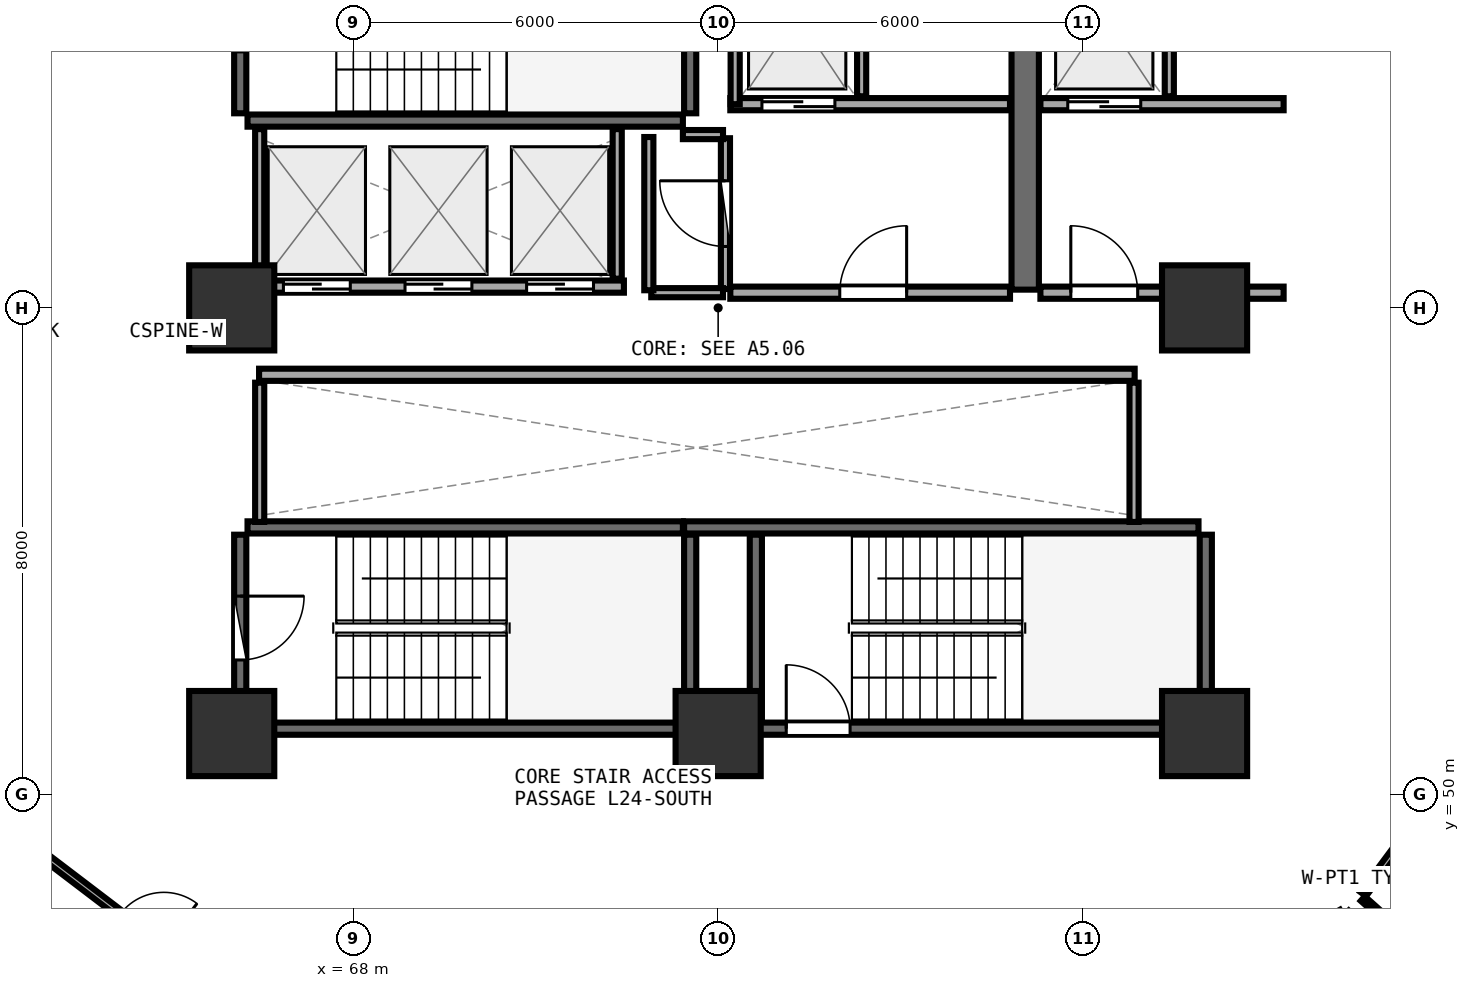
"""IFC4 building model, lengths in metres.
Left out: names, types, materials, properties, quantities, classifications, styles, units other than length and angle.
Written with IfcOpenShell. Run it as: python <this file> out.ifc"""

import sys

from ifc_helpers import new_model, si_unit, direction, frame, frame_2d, origin, origin_2d, place, context, subcontext, project, spatial, rectangle, extrude, element, fill, save


model = new_model("IFC4")
c1 = context("Model", 3, precision=1e-05, world=origin(), true_north=direction((0.0, 1.0)))
c2 = subcontext(c1, "Body", "Model", "MODEL_VIEW")
j1 = project(units=[si_unit("LENGTHUNIT", "METRE"), si_unit("PLANEANGLEUNIT", "RADIAN")], contexts=[c1])
p1 = place(None, origin())
s1 = spatial("IfcSite", under=j1, at=p1, CompositionType="ELEMENT")
p2 = place(p1, origin())
s2 = spatial("IfcBuilding", under=s1, at=p2, CompositionType="ELEMENT")
p3 = place(p2, frame((0.0, 0.0, 95.1)))
s3 = spatial("IfcBuildingStorey", under=s2, at=p3, CompositionType="ELEMENT", Elevation=95.1)
for number, where, z_axis, x_axis in (
    (1, (66.0, 51.0, 0.0), (0.0, 0.0, 1.0), (1.0, 0.0, 0.0)),
    (2, (74.0, 51.0, 0.0), (0.0, 0.0, 1.0), (1.0, 0.0, 0.0)),
    (3, (82.0, 51.0, 0.0), (0.0, 0.0, 1.0), (1.0, 0.0, 0.0)),
    (4, (82.0, 58.0, 0.0), (0.0, 0.0, 1.0), (1.0, 0.0, 0.0)),
    (5, (66.0, 58.0, 0.0), (0.0, 0.0, 1.0), (1.0, 0.0, 0.0)),
):
    element("IfcColumn", number, at=place(p3, frame(where, z_axis=z_axis, x_axis=x_axis)), inside=s3, PredefinedType="PILASTER", context=c2, shape_type="SweptSolid", body=[
        extrude(rectangle(XDim=1.4, YDim=1.4, at=origin_2d()), origin(), (0.0, 0.0, 1.0), 3.75),
    ])
p4 = place(p3, frame((66.26, 61.08, 0.0), z_axis=(0.0, 0.0, 1.0), x_axis=(1.0, 0.0, 0.0)))
e6 = element("IfcWall", 6, at=p4, inside=s3, PredefinedType="SHEAR", context=c2, shape_type="SweptSolid", body=[
    extrude(rectangle(XDim=7.16, YDim=0.2, at=frame_2d((3.58, 0.0))), origin(), (0.0, 0.0, 1.0), 3.49),
])
p5 = place(p3, frame((73.54, 61.2, 0.0), z_axis=(0.0, 0.0, 1.0), x_axis=(0.0, 1.0, 0.0)))
e7 = element("IfcWall", 7, at=p5, inside=s3, PredefinedType="SHEAR", context=c2, shape_type="SweptSolid", body=[
    extrude(rectangle(XDim=3.07, YDim=0.2, at=frame_2d((1.535, 0.0))), origin(), (0.0, 0.0, 1.0), 3.49),
])
p6 = place(p3, frame((66.14, 64.27, 0.0), z_axis=(0.0, 0.0, 1.0), x_axis=(0.0, -1.0, 0.0)))
e8 = element("IfcWall", 8, at=p6, inside=s3, PredefinedType="SHEAR", context=c2, shape_type="SweptSolid", body=[
    extrude(rectangle(XDim=3.07, YDim=0.2, at=frame_2d((1.535, 0.0))), origin(), (0.0, 0.0, 1.0), 3.49),
])
p7 = place(p6, frame((1.01, 0.0, 0.0)))
e9 = element("IfcOpeningElement", 9, at=p7, cuts=e8, PredefinedType="OPENING", context=c2, shape_type="SweptSolid", body=[
    extrude(rectangle(XDim=1.05, YDim=2.1, at=frame_2d((0.525, 1.05))), frame((0.0, 0.11, 0.0), z_axis=(0.0, -1.0, 0.0), x_axis=(1.0, 0.0, 0.0)), (0.0, 0.0, 1.0), 0.22),
])
p8 = place(p3, frame((74.0, 51.08, 0.0), z_axis=(0.0, 0.0, 1.0), x_axis=(1.0, 0.0, 0.0)))
e10 = element("IfcWall", 10, at=p8, inside=s3, PredefinedType="SHEAR", context=c2, shape_type="SweptSolid", body=[
    extrude(rectangle(XDim=7.9, YDim=0.2, at=frame_2d((3.95, 0.0))), origin(), (0.0, 0.0, 1.0), 3.49),
])
p9 = place(p8, frame((1.12, 0.0, 0.0)))
e11 = element("IfcOpeningElement", 11, at=p9, cuts=e10, PredefinedType="OPENING", context=c2, shape_type="SweptSolid", body=[
    extrude(rectangle(XDim=1.05, YDim=2.1, at=frame_2d((0.525, 1.05))), frame((0.0, 0.11, 0.0), z_axis=(0.0, -1.0, 0.0), x_axis=(1.0, 0.0, 0.0)), (0.0, 0.0, 1.0), 0.22),
])
p10 = place(p3, frame((82.02, 51.2, 0.0), z_axis=(0.0, 0.0, 1.0), x_axis=(0.0, 1.0, 0.0)))
e12 = element("IfcWall", 12, at=p10, inside=s3, PredefinedType="SHEAR", context=c2, shape_type="SweptSolid", body=[
    extrude(rectangle(XDim=3.07, YDim=0.2, at=frame_2d((1.535, 0.0))), origin(), (0.0, 0.0, 1.0), 3.49),
])
p11 = place(p3, frame((81.9, 54.39, 0.0), z_axis=(0.0, 0.0, 1.0), x_axis=(-1.0, 0.0, 0.0)))
e13 = element("IfcWall", 13, at=p11, inside=s3, PredefinedType="SHEAR", context=c2, shape_type="SweptSolid", body=[
    extrude(rectangle(XDim=8.46, YDim=0.2, at=frame_2d((4.23, 0.0))), origin(), (0.0, 0.0, 1.0), 3.49),
])
p12 = place(p3, frame((74.62, 54.27, 0.0), z_axis=(0.0, 0.0, 1.0), x_axis=(0.0, -1.0, 0.0)))
e14 = element("IfcWall", 14, at=p12, inside=s3, PredefinedType="SHEAR", context=c2, shape_type="SweptSolid", body=[
    extrude(rectangle(XDim=3.07, YDim=0.2, at=frame_2d((1.535, 0.0))), origin(), (0.0, 0.0, 1.0), 3.49),
])
p13 = place(p3, frame((66.26, 51.08, 0.0), z_axis=(0.0, 0.0, 1.0), x_axis=(1.0, 0.0, 0.0)))
e15 = element("IfcWall", 15, at=p13, inside=s3, PredefinedType="SHEAR", context=c2, shape_type="SweptSolid", body=[
    extrude(rectangle(XDim=7.16, YDim=0.2, at=frame_2d((3.58, 0.0))), origin(), (0.0, 0.0, 1.0), 3.49),
])
p14 = place(p3, frame((73.54, 51.2, 0.0), z_axis=(0.0, 0.0, 1.0), x_axis=(0.0, 1.0, 0.0)))
e16 = element("IfcWall", 16, at=p14, inside=s3, PredefinedType="SHEAR", context=c2, shape_type="SweptSolid", body=[
    extrude(rectangle(XDim=3.07, YDim=0.2, at=frame_2d((1.535, 0.0))), origin(), (0.0, 0.0, 1.0), 3.49),
])
p15 = place(p3, frame((73.42, 54.39, 0.0), z_axis=(0.0, 0.0, 1.0), x_axis=(-1.0, 0.0, 0.0)))
e17 = element("IfcWall", 17, at=p15, inside=s3, PredefinedType="SHEAR", context=c2, shape_type="SweptSolid", body=[
    extrude(rectangle(XDim=7.16, YDim=0.2, at=frame_2d((3.58, 0.0))), origin(), (0.0, 0.0, 1.0), 3.49),
])
p16 = place(p3, frame((66.14, 54.27, 0.0), z_axis=(0.0, 0.0, 1.0), x_axis=(0.0, -1.0, 0.0)))
e18 = element("IfcWall", 18, at=p16, inside=s3, PredefinedType="SHEAR", context=c2, shape_type="SweptSolid", body=[
    extrude(rectangle(XDim=3.07, YDim=0.2, at=frame_2d((1.535, 0.0))), origin(), (0.0, 0.0, 1.0), 3.49),
])
p17 = place(p16, frame((1.01, 0.0, 0.0)))
e19 = element("IfcOpeningElement", 19, at=p17, cuts=e18, PredefinedType="OPENING", context=c2, shape_type="SweptSolid", body=[
    extrude(rectangle(XDim=1.05, YDim=2.1, at=frame_2d((0.525, 1.05))), frame((0.0, 0.11, 0.0), z_axis=(0.0, -1.0, 0.0), x_axis=(1.0, 0.0, 0.0)), (0.0, 0.0, 1.0), 0.22),
])
p18 = place(p3, frame((79.05, 58.3, 0.0), z_axis=(0.0, 0.0, 1.0), x_axis=(0.0, 1.0, 0.0)))
e20 = element("IfcWall", 20, at=p18, inside=s3, PredefinedType="SHEAR", context=c2, shape_type="SweptSolid", body=[
    extrude(rectangle(XDim=6.3, YDim=0.45, at=frame_2d((3.15, 0.0))), origin(), (0.0, 0.0, 1.0), 3.49),
])
p19 = place(p3, frame((74.2, 61.35, 0.0), z_axis=(0.0, 0.0, 1.0), x_axis=(1.0, 0.0, 0.0)))
e21 = element("IfcWall", 21, at=p19, inside=s3, PredefinedType="SOLIDWALL", context=c2, shape_type="SweptSolid", body=[
    extrude(rectangle(XDim=4.6, YDim=0.2, at=frame_2d((2.3, 0.0))), origin(), (0.0, 0.0, 1.0), 3.48),
])
p20 = place(p19, frame((0.52, 0.0, 0.0)))
e22 = element("IfcOpeningElement", 22, at=p20, cuts=e21, PredefinedType="OPENING", context=c2, shape_type="SweptSolid", body=[
    extrude(rectangle(XDim=1.2, YDim=2.15, at=frame_2d((0.6, 1.075))), frame((0.0, 0.11, 0.0), z_axis=(0.0, -1.0, 0.0), x_axis=(1.0, 0.0, 0.0)), (0.0, 0.0, 1.0), 0.22),
])
p21 = place(p3, frame((74.28, 61.35, 0.0), z_axis=(0.0, 0.0, 1.0), x_axis=(0.0, 1.0, 0.0)))
e23 = element("IfcWall", 23, at=p21, inside=s3, PredefinedType="PARTITIONING", context=c2, shape_type="SweptSolid", body=[
    extrude(rectangle(XDim=2.97, YDim=0.15, at=frame_2d((1.485, 0.0))), origin(), (0.0, 0.0, 1.0), 3.48),
])
p22 = place(p3, frame((76.36, 61.48, 0.0), z_axis=(0.0, 0.0, 1.0), x_axis=(0.0, 1.0, 0.0)))
e24 = element("IfcWall", 24, at=p22, inside=s3, PredefinedType="PARTITIONING", context=c2, shape_type="SweptSolid", body=[
    extrude(rectangle(XDim=2.84, YDim=0.15, at=frame_2d((1.42, 0.0))), origin(), (0.0, 0.0, 1.0), 3.48),
])
p23 = place(p3, frame((79.3, 61.35, 0.0), z_axis=(0.0, 0.0, 1.0), x_axis=(1.0, 0.0, 0.0)))
e25 = element("IfcWall", 25, at=p23, inside=s3, PredefinedType="SOLIDWALL", context=c2, shape_type="SweptSolid", body=[
    extrude(rectangle(XDim=4.0, YDim=0.2, at=frame_2d((2.0, 0.0))), origin(), (0.0, 0.0, 1.0), 2.775),
])
p24 = place(p23, frame((0.45, 0.0, 0.0)))
e26 = element("IfcOpeningElement", 26, at=p24, cuts=e25, PredefinedType="OPENING", context=c2, shape_type="SweptSolid", body=[
    extrude(rectangle(XDim=1.2, YDim=2.15, at=frame_2d((0.6, 1.075))), frame((0.0, 0.11, 0.0), z_axis=(0.0, -1.0, 0.0), x_axis=(1.0, 0.0, 0.0)), (0.0, 0.0, 1.0), 0.22),
])
p25 = place(p3, frame((81.42, 61.48, 0.0), z_axis=(0.0, 0.0, 1.0), x_axis=(0.0, 1.0, 0.0)))
e27 = element("IfcWall", 27, at=p25, inside=s3, PredefinedType="PARTITIONING", context=c2, shape_type="SweptSolid", body=[
    extrude(rectangle(XDim=2.84, YDim=0.15, at=frame_2d((1.42, 0.0))), origin(), (0.0, 0.0, 1.0), 3.48),
])
p26 = place(p3, frame((74.2, 58.25, 0.0), z_axis=(0.0, 0.0, 1.0), x_axis=(1.0, 0.0, 0.0)))
e28 = element("IfcWall", 28, at=p26, inside=s3, PredefinedType="SOLIDWALL", context=c2, shape_type="SweptSolid", body=[
    extrude(rectangle(XDim=4.6, YDim=0.2, at=frame_2d((2.3, 0.0))), origin(), (0.0, 0.0, 1.0), 3.48),
])
p27 = place(p26, frame((1.8, 0.0, 0.0)))
e29 = element("IfcOpeningElement", 29, at=p27, cuts=e28, PredefinedType="OPENING", context=c2, shape_type="SweptSolid", body=[
    extrude(rectangle(XDim=1.1, YDim=2.1, at=frame_2d((0.55, 1.05))), frame((0.0, 0.11, 0.0), z_axis=(0.0, -1.0, 0.0), x_axis=(1.0, 0.0, 0.0)), (0.0, 0.0, 1.0), 0.22),
])
p28 = place(p3, frame((79.3, 58.25, 0.0), z_axis=(0.0, 0.0, 1.0), x_axis=(1.0, 0.0, 0.0)))
e30 = element("IfcWall", 30, at=p28, inside=s3, PredefinedType="SOLIDWALL", context=c2, shape_type="SweptSolid", body=[
    extrude(rectangle(XDim=4.0, YDim=0.2, at=frame_2d((2.0, 0.0))), origin(), (0.0, 0.0, 1.0), 2.775),
])
p29 = place(p28, frame((0.5, 0.0, 0.0)))
e31 = element("IfcOpeningElement", 31, at=p29, cuts=e30, PredefinedType="OPENING", context=c2, shape_type="SweptSolid", body=[
    extrude(rectangle(XDim=1.1, YDim=2.1, at=frame_2d((0.55, 1.05))), frame((0.0, 0.11, 0.0), z_axis=(0.0, -1.0, 0.0), x_axis=(1.0, 0.0, 0.0)), (0.0, 0.0, 1.0), 0.22),
])
p30 = place(p3, frame((66.45, 58.35, 0.0), z_axis=(0.0, 0.0, 1.0), x_axis=(1.0, 0.0, 0.0)))
e32 = element("IfcWall", 32, at=p30, inside=s3, PredefinedType="SOLIDWALL", context=c2, shape_type="SweptSolid", body=[
    extrude(rectangle(XDim=6.0, YDim=0.2, at=frame_2d((3.0, 0.0))), origin(), (0.0, 0.0, 1.0), 3.48),
])
p31 = place(p30, frame((0.4, 0.0, 0.0)))
e33 = element("IfcOpeningElement", 33, at=p31, cuts=e32, PredefinedType="OPENING", context=c2, shape_type="SweptSolid", body=[
    extrude(rectangle(XDim=1.1, YDim=2.1, at=frame_2d((0.55, 1.05))), frame((0.0, 0.11, 0.0), z_axis=(0.0, -1.0, 0.0), x_axis=(1.0, 0.0, 0.0)), (0.0, 0.0, 1.0), 0.22),
])
p32 = place(p30, frame((2.4, 0.0, 0.0)))
e34 = element("IfcOpeningElement", 34, at=p32, cuts=e32, PredefinedType="OPENING", context=c2, shape_type="SweptSolid", body=[
    extrude(rectangle(XDim=1.1, YDim=2.1, at=frame_2d((0.55, 1.05))), frame((0.0, 0.11, 0.0), z_axis=(0.0, -1.0, 0.0), x_axis=(1.0, 0.0, 0.0)), (0.0, 0.0, 1.0), 0.22),
])
p33 = place(p30, frame((4.4, 0.0, 0.0)))
e35 = element("IfcOpeningElement", 35, at=p33, cuts=e32, PredefinedType="OPENING", context=c2, shape_type="SweptSolid", body=[
    extrude(rectangle(XDim=1.1, YDim=2.1, at=frame_2d((0.55, 1.05))), frame((0.0, 0.11, 0.0), z_axis=(0.0, -1.0, 0.0), x_axis=(1.0, 0.0, 0.0)), (0.0, 0.0, 1.0), 0.22),
])
for number, where, z_axis, x_axis in (
    (36, (66.46, 58.48, 0.0), (0.0, 0.0, 1.0), (0.0, 1.0, 0.0)),
    (37, (72.34, 58.48, 0.0), (0.0, 0.0, 1.0), (0.0, 1.0, 0.0)),
):
    element("IfcWall", number, at=place(p3, frame(where, z_axis=z_axis, x_axis=x_axis)), inside=s3, PredefinedType="PARTITIONING", context=c2, shape_type="SweptSolid", body=[
        extrude(rectangle(XDim=2.46, YDim=0.15, at=frame_2d((1.23, 0.0))), origin(), (0.0, 0.0, 1.0), 3.48),
    ])
p34 = place(p3, frame((66.45, 56.9, 0.0), z_axis=(0.0, 0.0, 1.0), x_axis=(1.0, 0.0, 0.0)))
e38 = element("IfcWall", 38, at=p34, inside=s3, PredefinedType="SOLIDWALL", context=c2, shape_type="SweptSolid", body=[
    extrude(rectangle(XDim=14.4, YDim=0.2, at=frame_2d((7.2, 0.0))), origin(), (0.0, 0.0, 1.0), 3.48),
])
for number, where, z_axis, x_axis in (
    (39, (66.46, 54.48, 0.0), (0.0, 0.0, 1.0), (0.0, 1.0, 0.0)),
    (40, (80.84, 54.48, 0.0), (0.0, 0.0, 1.0), (0.0, 1.0, 0.0)),
):
    element("IfcWall", number, at=place(p3, frame(where, z_axis=z_axis, x_axis=x_axis)), inside=s3, PredefinedType="PARTITIONING", context=c2, shape_type="SweptSolid", body=[
        extrude(rectangle(XDim=2.29, YDim=0.15, at=frame_2d((1.145, 0.0))), origin(), (0.0, 0.0, 1.0), 3.48),
    ])
p35 = place(p3, frame((74.12, 58.31, 0.0), z_axis=(0.0, 0.0, 1.0), x_axis=(0.0, 1.0, 0.0)))
e41 = element("IfcWall", 41, at=p35, inside=s3, PredefinedType="PARTITIONING", context=c2, shape_type="SweptSolid", body=[
    extrude(rectangle(XDim=2.48, YDim=0.15, at=frame_2d((1.24, 0.0))), origin(), (0.0, 0.0, 1.0), 3.48),
])
p36 = place(p35, frame((0.7, 0.0, 0.0)))
e42 = element("IfcOpeningElement", 42, at=p36, cuts=e41, PredefinedType="OPENING", context=c2, shape_type="SweptSolid", body=[
    extrude(rectangle(XDim=1.08, YDim=2.1, at=frame_2d((0.54, 1.05))), frame((0.0, 0.085, 0.0), z_axis=(0.0, -1.0, 0.0), x_axis=(1.0, 0.0, 0.0)), (0.0, 0.0, 1.0), 0.17),
])
p37 = place(p3, frame((62.318, 49.442, 0.0), z_axis=(0.0, 0.0, 1.0), x_axis=(0.795762794985, -0.605608432997, 0.0)))
e43 = element("IfcWall", 43, at=p37, inside=s3, PredefinedType="PARTITIONING", context=c2, shape_type="SweptSolid", body=[
    extrude(rectangle(XDim=5.55, YDim=0.12, at=frame_2d((2.775, 0.0))), origin(), (0.0, 0.0, 1.0), 2.925),
])
p38 = place(p37, frame((2.325, 0.0, 0.0)))
e44 = element("IfcOpeningElement", 44, at=p38, cuts=e43, PredefinedType="OPENING", context=c2, shape_type="SweptSolid", body=[
    extrude(rectangle(XDim=0.9, YDim=2.08, at=frame_2d((0.45, 1.04))), frame((0.0, 0.07, 0.0), z_axis=(0.0, -1.0, 0.0), x_axis=(1.0, 0.0, 0.0)), (0.0, 0.0, 1.0), 0.14),
])
p39 = place(p3, frame((84.608, 48.36, 0.0), z_axis=(0.0, 0.0, 1.0), x_axis=(0.596833425992, 0.802365167251, 0.0)))
e45 = element("IfcWall", 45, at=p39, inside=s3, PredefinedType="PARTITIONING", context=c2, shape_type="SweptSolid", body=[
    extrude(rectangle(XDim=5.399, YDim=0.12, at=frame_2d((2.699, 0.0))), origin(), (0.0, 0.0, 1.0), 2.925),
])
p40 = place(p39, frame((2.249, 0.0, 0.0)))
e46 = element("IfcOpeningElement", 46, at=p40, cuts=e45, PredefinedType="OPENING", context=c2, shape_type="SweptSolid", body=[
    extrude(rectangle(XDim=0.9, YDim=2.08, at=frame_2d((0.45, 1.04))), frame((0.0, 0.07, 0.0), z_axis=(0.0, -1.0, 0.0), x_axis=(1.0, 0.0, 0.0)), (0.0, 0.0, 1.0), 0.14),
])
p41 = place(p3, frame((72.9, 58.25, 0.0), z_axis=(0.0, 0.0, 1.0), x_axis=(1.0, 0.0, 0.0)))
e47 = element("IfcWall", 47, at=p41, inside=s3, PredefinedType="PARTITIONING", context=c2, shape_type="SweptSolid", body=[
    extrude(rectangle(XDim=1.18, YDim=0.15, at=frame_2d((0.59, 0.0))), origin(), (0.0, 0.0, 1.0), 3.48),
])
p42 = place(p3, frame((74.08, 60.85, 0.0), z_axis=(0.0, 0.0, 1.0), x_axis=(-1.0, 0.0, 0.0)))
e48 = element("IfcWall", 48, at=p42, inside=s3, PredefinedType="PARTITIONING", context=c2, shape_type="SweptSolid", body=[
    extrude(rectangle(XDim=0.66, YDim=0.15, at=frame_2d((0.33, 0.0))), origin(), (0.0, 0.0, 1.0), 3.48),
])
p43 = place(p3, frame((72.86, 60.81, 0.0), z_axis=(0.0, 0.0, 1.0), x_axis=(0.0, -1.0, 0.0)))
e49 = element("IfcWall", 49, at=p43, inside=s3, PredefinedType="PARTITIONING", context=c2, shape_type="SweptSolid", body=[
    extrude(rectangle(XDim=2.52, YDim=0.15, at=frame_2d((1.26, 0.0))), origin(), (0.0, 0.0, 1.0), 3.48),
])
p44 = place(p3, frame((91.611, 42.048, 0.0), z_axis=(0.0, 0.0, 1.0), x_axis=(-0.747021589751, 0.664799777713, 0.0)))
e50 = element("IfcWall", 50, at=p44, inside=s3, PredefinedType="PARTITIONING", context=c2, shape_type="SweptSolid", body=[
    extrude(rectangle(XDim=9.383, YDim=0.1, at=frame_2d((4.691, 0.0))), origin(), (0.0, 0.0, 1.0), 2.975),
])
p45 = place(p9, origin())
e51 = element("IfcDoor", 51, at=p45, inside=s3, OperationType="SINGLE_SWING_LEFT", PredefinedType="DOOR", context=c2, shape_type="SweptSolid", body=[
    extrude(rectangle(XDim=1.05, YDim=2.1, at=frame_2d((0.525, 1.05))), frame((0.0, 0.025, 0.0), z_axis=(0.0, -1.0, 0.0), x_axis=(1.0, 0.0, 0.0)), (0.0, 0.0, 1.0), 0.05),
])
fill(e11, e51)
p46 = place(p17, origin())
e52 = element("IfcDoor", 52, at=p46, inside=s3, OperationType="SINGLE_SWING_LEFT", PredefinedType="DOOR", context=c2, shape_type="SweptSolid", body=[
    extrude(rectangle(XDim=1.05, YDim=2.1, at=frame_2d((0.525, 1.05))), frame((0.0, 0.025, 0.0), z_axis=(0.0, -1.0, 0.0), x_axis=(1.0, 0.0, 0.0)), (0.0, 0.0, 1.0), 0.05),
])
fill(e19, e52)
p47 = place(p20, origin())
e53 = element("IfcDoor", 53, at=p47, inside=s3, OperationType="DOUBLE_DOOR_SLIDING", PredefinedType="DOOR", context=c2, shape_type="SweptSolid", body=[
    extrude(rectangle(XDim=1.2, YDim=2.15, at=frame_2d((0.6, 1.075))), frame((0.0, 0.025, 0.0), z_axis=(0.0, -1.0, 0.0), x_axis=(1.0, 0.0, 0.0)), (0.0, 0.0, 1.0), 0.05),
])
fill(e22, e53)
p48 = place(p24, origin())
e54 = element("IfcDoor", 54, at=p48, inside=s3, OperationType="DOUBLE_DOOR_SLIDING", PredefinedType="DOOR", context=c2, shape_type="SweptSolid", body=[
    extrude(rectangle(XDim=1.2, YDim=2.15, at=frame_2d((0.6, 1.075))), frame((0.0, 0.025, 0.0), z_axis=(0.0, -1.0, 0.0), x_axis=(1.0, 0.0, 0.0)), (0.0, 0.0, 1.0), 0.05),
])
fill(e26, e54)
p49 = place(p27, frame((1.1, 0.0, 0.0), z_axis=(0.0, 0.0, 1.0), x_axis=(-1.0, 0.0, 0.0)))
e55 = element("IfcDoor", 55, at=p49, inside=s3, OperationType="SINGLE_SWING_LEFT", PredefinedType="DOOR", context=c2, shape_type="SweptSolid", body=[
    extrude(rectangle(XDim=1.1, YDim=2.1, at=frame_2d((0.55, 1.05))), frame((0.0, 0.025, 0.0), z_axis=(0.0, -1.0, 0.0), x_axis=(1.0, 0.0, 0.0)), (0.0, 0.0, 1.0), 0.05),
])
fill(e29, e55)
p50 = place(p29, frame((1.1, 0.0, 0.0), z_axis=(0.0, 0.0, 1.0), x_axis=(-1.0, 0.0, 0.0)))
e56 = element("IfcDoor", 56, at=p50, inside=s3, OperationType="SINGLE_SWING_RIGHT", PredefinedType="DOOR", context=c2, shape_type="SweptSolid", body=[
    extrude(rectangle(XDim=1.1, YDim=2.1, at=frame_2d((0.55, 1.05))), frame((0.0, 0.025, 0.0), z_axis=(0.0, -1.0, 0.0), x_axis=(1.0, 0.0, 0.0)), (0.0, 0.0, 1.0), 0.05),
])
fill(e31, e56)
p51 = place(p31, origin())
e57 = element("IfcDoor", 57, at=p51, inside=s3, OperationType="DOUBLE_DOOR_SLIDING", PredefinedType="DOOR", context=c2, shape_type="SweptSolid", body=[
    extrude(rectangle(XDim=1.1, YDim=2.1, at=frame_2d((0.55, 1.05))), frame((0.0, 0.025, 0.0), z_axis=(0.0, -1.0, 0.0), x_axis=(1.0, 0.0, 0.0)), (0.0, 0.0, 1.0), 0.05),
])
fill(e33, e57)
p52 = place(p32, origin())
e58 = element("IfcDoor", 58, at=p52, inside=s3, OperationType="DOUBLE_DOOR_SLIDING", PredefinedType="DOOR", context=c2, shape_type="SweptSolid", body=[
    extrude(rectangle(XDim=1.1, YDim=2.1, at=frame_2d((0.55, 1.05))), frame((0.0, 0.025, 0.0), z_axis=(0.0, -1.0, 0.0), x_axis=(1.0, 0.0, 0.0)), (0.0, 0.0, 1.0), 0.05),
])
fill(e34, e58)
p53 = place(p33, origin())
e59 = element("IfcDoor", 59, at=p53, inside=s3, OperationType="DOUBLE_DOOR_SLIDING", PredefinedType="DOOR", context=c2, shape_type="SweptSolid", body=[
    extrude(rectangle(XDim=1.1, YDim=2.1, at=frame_2d((0.55, 1.05))), frame((0.0, 0.025, 0.0), z_axis=(0.0, -1.0, 0.0), x_axis=(1.0, 0.0, 0.0)), (0.0, 0.0, 1.0), 0.05),
])
fill(e35, e59)
p54 = place(p36, origin())
e60 = element("IfcDoor", 60, at=p54, inside=s3, OperationType="SINGLE_SWING_RIGHT", PredefinedType="DOOR", context=c2, shape_type="SweptSolid", body=[
    extrude(rectangle(XDim=1.08, YDim=2.1, at=frame_2d((0.54, 1.05))), frame((0.0, 0.025, 0.0), z_axis=(0.0, -1.0, 0.0), x_axis=(1.0, 0.0, 0.0)), (0.0, 0.0, 1.0), 0.05),
])
fill(e42, e60)
save(model, sys.argv[1])
